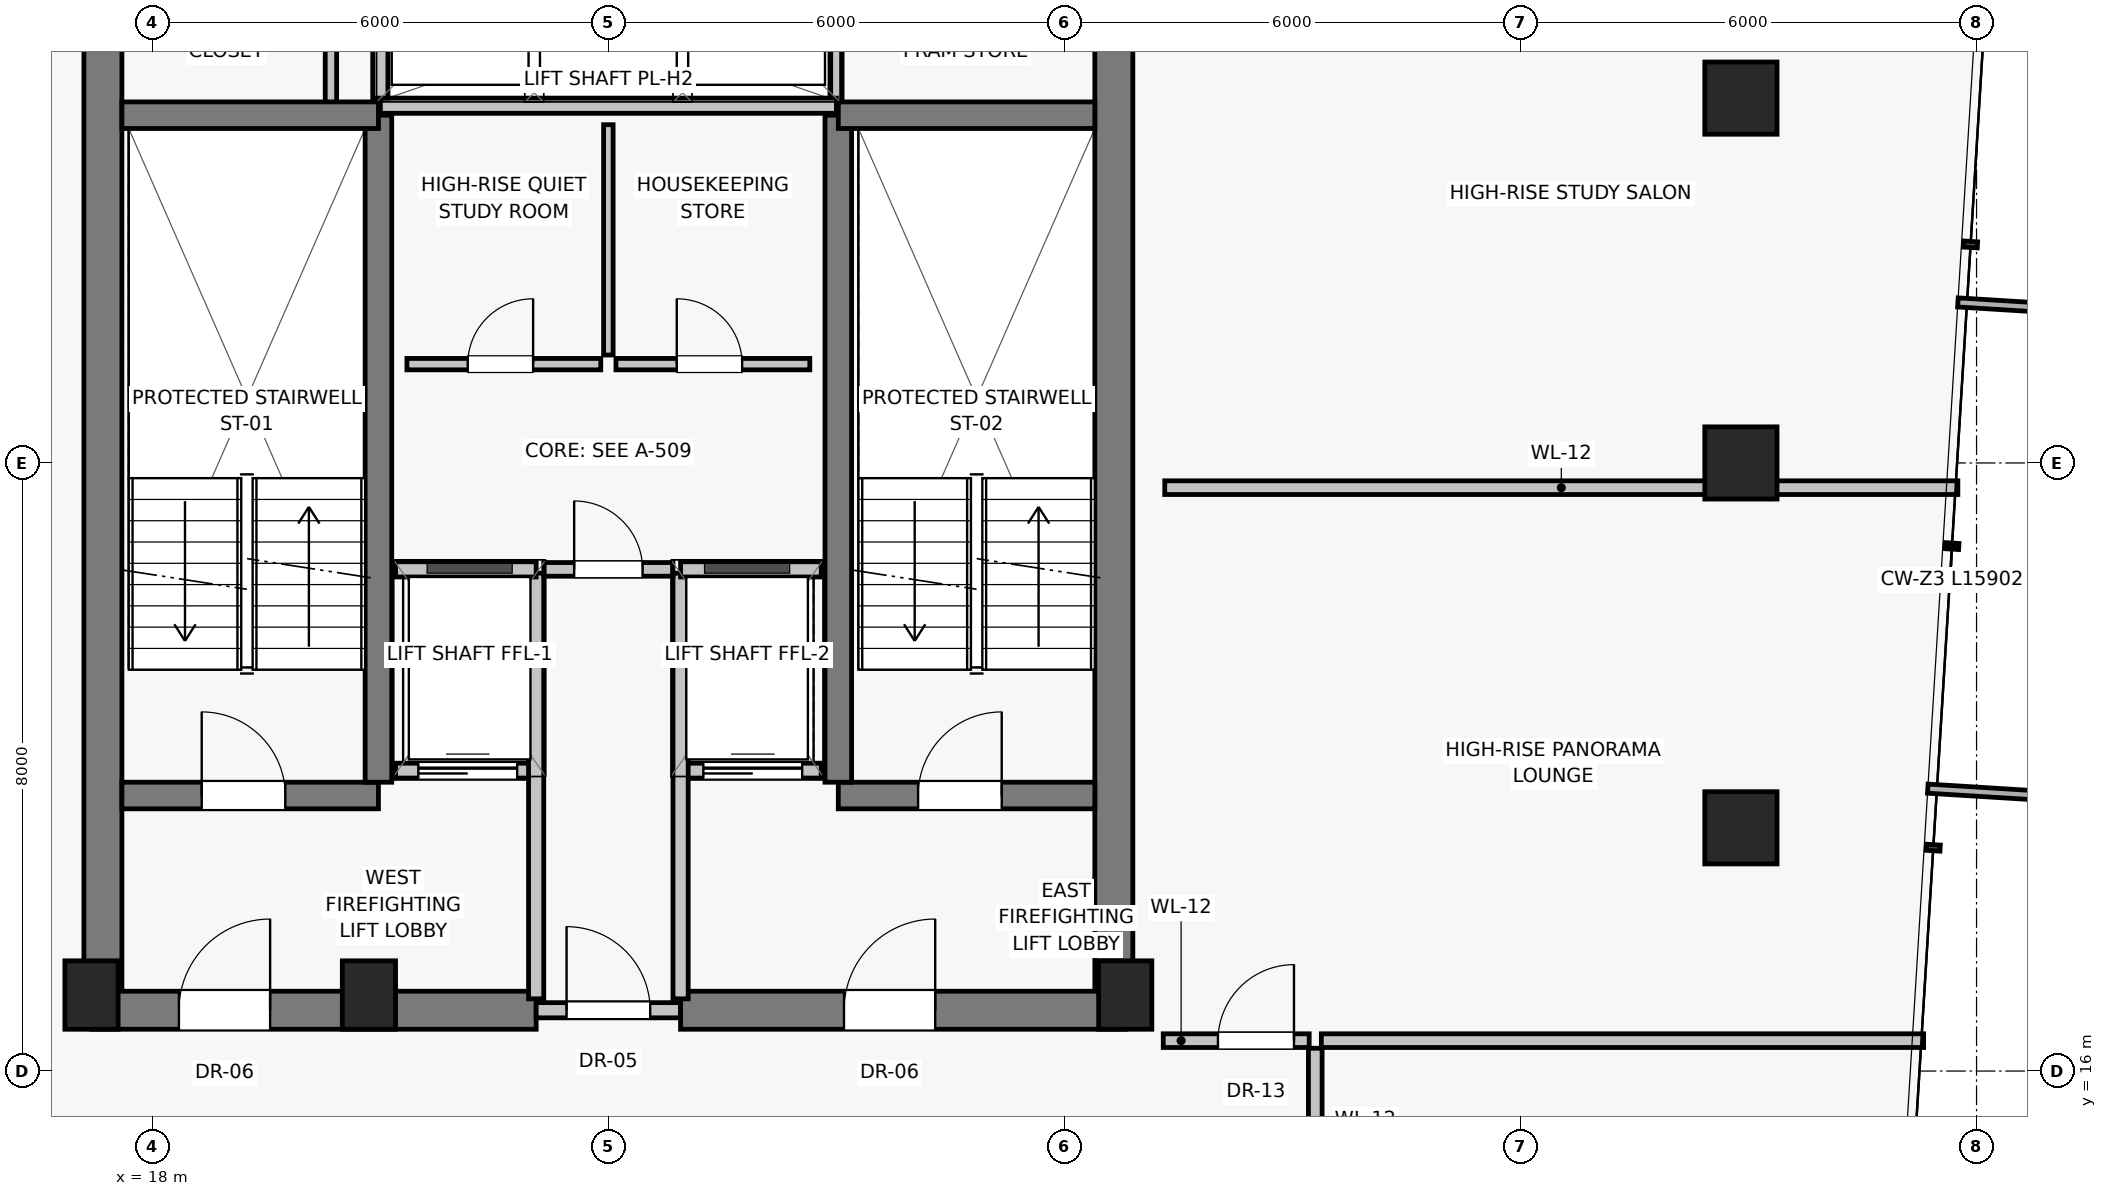
"""IFC4 building model, lengths in metres.
Left out: names, types, materials, properties, quantities, classifications, styles, units other than length and angle.
Written with IfcOpenShell. Run it as: python <this file> out.ifc"""

import sys

from ifc_helpers import new_model, si_unit, direction, frame, frame_2d, origin, origin_2d, place, context, subcontext, project, spatial, rectangle, extrude, source, transform, mapped, element, fill, save


model = new_model("IFC4")
c1 = context("Model", 3, precision=1e-05, world=origin(), true_north=direction((0.0, 1.0)))
c2 = subcontext(c1, "Body", "Model", "MODEL_VIEW")
j1 = project(units=[si_unit("LENGTHUNIT", "METRE"), si_unit("PLANEANGLEUNIT", "RADIAN")], contexts=[c1])
p1 = place(None, origin())
s1 = spatial("IfcSite", under=j1, at=p1, CompositionType="ELEMENT")
p2 = place(p1, origin())
s2 = spatial("IfcBuilding", under=s1, at=p2, CompositionType="ELEMENT")
p3 = place(p2, frame((0.0, 0.0, 218.9)))
s3 = spatial("IfcBuildingStorey", under=s2, at=p3, CompositionType="ELEMENT", Elevation=218.9)
for number, where, z_axis, x_axis in (
    (1, (17.2, 17.0, 0.0), (0.0, 0.0, 1.0), (1.0, 0.0, 0.0)),
    (2, (20.85, 17.0, 0.0), (0.0, 0.0, 1.0), (1.0, 0.0, 0.0)),
    (3, (30.8, 17.0, 0.0), (0.0, 0.0, 1.0), (1.0, 0.0, 0.0)),
):
    element("IfcColumn", number, at=place(p3, frame(where, z_axis=z_axis, x_axis=x_axis)), inside=s3, PredefinedType="PILASTER", context=c2, shape_type="SweptSolid", body=[
        extrude(rectangle(XDim=0.7, YDim=0.9, at=origin_2d()), origin(), (0.0, 0.0, 1.0), 3.25),
    ])
for number, where, z_axis, x_axis in (
    (4, (38.9, 19.2, 0.0), (0.0, 0.0, 1.0), (1.0, 0.0, 0.0)),
    (5, (38.9, 24.0, 0.0), (0.0, 0.0, 1.0), (1.0, 0.0, 0.0)),
    (6, (38.9, 28.8, 0.0), (0.0, 0.0, 1.0), (1.0, 0.0, 0.0)),
):
    element("IfcColumn", number, at=place(p3, frame(where, z_axis=z_axis, x_axis=x_axis)), inside=s3, PredefinedType="COLUMN", context=c2, shape_type="SweptSolid", body=[
        extrude(rectangle(XDim=0.95, YDim=0.95, at=origin_2d()), origin(), (0.0, 0.0, 1.0), 3.25),
    ])
for number, where, z_axis, x_axis in (
    (7, (17.35, 16.8, 0.0), (0.0, 0.0, 1.0), (0.0, 1.0, 0.0)),
    (8, (30.65, 16.8, 0.0), (0.0, 0.0, 1.0), (0.0, 1.0, 0.0)),
):
    element("IfcWall", number, at=place(p3, frame(where, z_axis=z_axis, x_axis=x_axis)), inside=s3, PredefinedType="SHEAR", context=c2, shape_type="SweptSolid", body=[
        extrude(rectangle(XDim=14.2, YDim=0.5, at=frame_2d((7.1, 0.0))), origin(), (0.0, 0.0, 1.0), 3.015),
    ])
p4 = place(p3, frame((17.2, 16.8, 0.0), z_axis=(0.0, 0.0, 1.0), x_axis=(1.0, 0.0, 0.0)))
e9 = element("IfcWall", 9, at=p4, inside=s3, PredefinedType="SHEAR", context=c2, shape_type="SweptSolid", body=[
    extrude(rectangle(XDim=5.85, YDim=0.5, at=frame_2d((2.925, 0.0))), origin(), (0.0, 0.0, 1.0), 3.015),
])
p5 = place(p4, frame((1.15, 0.0, 0.0)))
e10 = element("IfcOpeningElement", 10, at=p5, cuts=e9, PredefinedType="OPENING", context=c2, shape_type="SweptSolid", body=[
    extrude(rectangle(XDim=1.2, YDim=2.03, at=frame_2d((0.6, 1.015))), frame((0.0, 0.26, 0.0), z_axis=(0.0, -1.0, 0.0), x_axis=(1.0, 0.0, 0.0)), (0.0, 0.0, 1.0), 0.52),
])
p6 = place(p3, frame((23.05, 16.8, 0.0), z_axis=(0.0, 0.0, 1.0), x_axis=(1.0, 0.0, 0.0)))
e11 = element("IfcWall", 11, at=p6, inside=s3, PredefinedType="SOLIDWALL", context=c2, shape_type="SweptSolid", body=[
    extrude(rectangle(XDim=1.9, YDim=0.2, at=frame_2d((0.95, 0.0))), origin(), (0.0, 0.0, 1.0), 2.165),
])
p7 = place(p6, frame((0.4, 0.0, 0.0)))
e12 = element("IfcOpeningElement", 12, at=p7, cuts=e11, PredefinedType="OPENING", context=c2, shape_type="SweptSolid", body=[
    extrude(rectangle(XDim=1.1, YDim=2.03, at=frame_2d((0.55, 1.015))), frame((0.0, 0.11, 0.0), z_axis=(0.0, -1.0, 0.0), x_axis=(1.0, 0.0, 0.0)), (0.0, 0.0, 1.0), 0.22),
])
p8 = place(p3, frame((24.95, 16.8, 0.0), z_axis=(0.0, 0.0, 1.0), x_axis=(1.0, 0.0, 0.0)))
e13 = element("IfcWall", 13, at=p8, inside=s3, PredefinedType="SHEAR", context=c2, shape_type="SweptSolid", body=[
    extrude(rectangle(XDim=5.85, YDim=0.5, at=frame_2d((2.925, 0.0))), origin(), (0.0, 0.0, 1.0), 3.015),
])
p9 = place(p8, frame((2.15, 0.0, 0.0)))
e14 = element("IfcOpeningElement", 14, at=p9, cuts=e13, PredefinedType="OPENING", context=c2, shape_type="SweptSolid", body=[
    extrude(rectangle(XDim=1.2, YDim=2.03, at=frame_2d((0.6, 1.015))), frame((0.0, 0.26, 0.0), z_axis=(0.0, -1.0, 0.0), x_axis=(1.0, 0.0, 0.0)), (0.0, 0.0, 1.0), 0.52),
])
for number, where, z_axis, x_axis in (
    (15, (20.35, 28.65, 0.0), (0.0, 0.0, 1.0), (0.0, 1.0, 0.0)),
    (16, (27.0, 28.65, 0.0), (0.0, 0.0, 1.0), (0.0, 1.0, 0.0)),
):
    element("IfcWall", number, at=place(p3, frame(where, z_axis=z_axis, x_axis=x_axis)), inside=s3, PredefinedType="PARTITIONING", context=c2, shape_type="SweptSolid", body=[
        extrude(rectangle(XDim=2.2, YDim=0.15, at=frame_2d((1.1, 0.0))), origin(), (0.0, 0.0, 1.0), 3.015),
    ])
p10 = place(p3, frame((17.6, 19.625, 0.0), z_axis=(0.0, 0.0, 1.0), x_axis=(1.0, 0.0, 0.0)))
e17 = element("IfcWall", 17, at=p10, inside=s3, PredefinedType="SHEAR", context=c2, shape_type="SweptSolid", body=[
    extrude(rectangle(XDim=3.375, YDim=0.35, at=frame_2d((1.688, 0.0))), origin(), (0.0, 0.0, 1.0), 3.015),
])
p11 = place(p10, frame((1.05, 0.0, 0.0)))
e18 = element("IfcOpeningElement", 18, at=p11, cuts=e17, PredefinedType="OPENING", context=c2, shape_type="SweptSolid", body=[
    extrude(rectangle(XDim=1.1, YDim=2.03, at=frame_2d((0.55, 1.015))), frame((0.0, 0.185, 0.0), z_axis=(0.0, -1.0, 0.0), x_axis=(1.0, 0.0, 0.0)), (0.0, 0.0, 1.0), 0.37),
])
p12 = place(p3, frame((21.2, 19.95, 0.0), z_axis=(0.0, 0.0, 1.0), x_axis=(1.0, 0.0, 0.0)))
e19 = element("IfcWall", 19, at=p12, inside=s3, PredefinedType="SOLIDWALL", context=c2, shape_type="SweptSolid", body=[
    extrude(rectangle(XDim=1.85, YDim=0.2, at=frame_2d((0.925, 0.0))), origin(), (0.0, 0.0, 1.0), 3.015),
])
p13 = place(p12, frame((0.3, 0.0, 0.0)))
e20 = element("IfcOpeningElement", 20, at=p13, cuts=e19, PredefinedType="OPENING", context=c2, shape_type="SweptSolid", body=[
    extrude(rectangle(XDim=1.3, YDim=2.25, at=frame_2d((0.65, 1.125))), frame((0.0, 0.11, 0.0), z_axis=(0.0, -1.0, 0.0), x_axis=(1.0, 0.0, 0.0)), (0.0, 0.0, 1.0), 0.22),
])
p14 = place(p3, frame((24.95, 19.95, 0.0), z_axis=(0.0, 0.0, 1.0), x_axis=(1.0, 0.0, 0.0)))
e21 = element("IfcWall", 21, at=p14, inside=s3, PredefinedType="SOLIDWALL", context=c2, shape_type="SweptSolid", body=[
    extrude(rectangle(XDim=1.85, YDim=0.2, at=frame_2d((0.925, 0.0))), origin(), (0.0, 0.0, 1.0), 3.015),
])
p15 = place(p14, frame((0.3, 0.0, 0.0)))
e22 = element("IfcOpeningElement", 22, at=p15, cuts=e21, PredefinedType="OPENING", context=c2, shape_type="SweptSolid", body=[
    extrude(rectangle(XDim=1.3, YDim=2.25, at=frame_2d((0.65, 1.125))), frame((0.0, 0.11, 0.0), z_axis=(0.0, -1.0, 0.0), x_axis=(1.0, 0.0, 0.0)), (0.0, 0.0, 1.0), 0.22),
])
p16 = place(p3, frame((27.025, 19.625, 0.0), z_axis=(0.0, 0.0, 1.0), x_axis=(1.0, 0.0, 0.0)))
e23 = element("IfcWall", 23, at=p16, inside=s3, PredefinedType="SHEAR", context=c2, shape_type="SweptSolid", body=[
    extrude(rectangle(XDim=3.375, YDim=0.35, at=frame_2d((1.688, 0.0))), origin(), (0.0, 0.0, 1.0), 3.015),
])
p17 = place(p16, frame((1.05, 0.0, 0.0)))
e24 = element("IfcOpeningElement", 24, at=p17, cuts=e23, PredefinedType="OPENING", context=c2, shape_type="SweptSolid", body=[
    extrude(rectangle(XDim=1.1, YDim=2.03, at=frame_2d((0.55, 1.015))), frame((0.0, 0.185, 0.0), z_axis=(0.0, -1.0, 0.0), x_axis=(1.0, 0.0, 0.0)), (0.0, 0.0, 1.0), 0.37),
])
for number, where, z_axis, x_axis in (
    (25, (20.975, 19.8, 0.0), (0.0, 0.0, 1.0), (0.0, 1.0, 0.0)),
    (26, (27.025, 19.8, 0.0), (0.0, 0.0, 1.0), (0.0, 1.0, 0.0)),
):
    element("IfcWall", number, at=place(p3, frame(where, z_axis=z_axis, x_axis=x_axis)), inside=s3, PredefinedType="SHEAR", context=c2, shape_type="SweptSolid", body=[
        extrude(rectangle(XDim=8.775, YDim=0.35, at=frame_2d((4.387, 0.0))), origin(), (0.0, 0.0, 1.0), 3.015),
    ])
for number, where, z_axis, x_axis in (
    (27, (17.6, 28.575, 0.0), (0.0, 0.0, 1.0), (1.0, 0.0, 0.0)),
    (28, (27.025, 28.575, 0.0), (0.0, 0.0, 1.0), (1.0, 0.0, 0.0)),
):
    element("IfcWall", number, at=place(p3, frame(where, z_axis=z_axis, x_axis=x_axis)), inside=s3, PredefinedType="SHEAR", context=c2, shape_type="SweptSolid", body=[
        extrude(rectangle(XDim=3.375, YDim=0.35, at=frame_2d((1.688, 0.0))), origin(), (0.0, 0.0, 1.0), 3.015),
    ])
for number, where, z_axis, x_axis in (
    (29, (23.05, 16.95, 0.0), (0.0, 0.0, 1.0), (0.0, 1.0, 0.0)),
    (30, (24.95, 16.95, 0.0), (0.0, 0.0, 1.0), (0.0, 1.0, 0.0)),
):
    element("IfcWall", number, at=place(p3, frame(where, z_axis=z_axis, x_axis=x_axis)), inside=s3, PredefinedType="SOLIDWALL", context=c2, shape_type="SweptSolid", body=[
        extrude(rectangle(XDim=5.6, YDim=0.2, at=frame_2d((2.8, 0.0))), origin(), (0.0, 0.0, 1.0), 3.015),
    ])
for number, where, z_axis, x_axis in (
    (31, (21.2, 22.6, 0.0), (0.0, 0.0, 1.0), (1.0, 0.0, 0.0)),
    (32, (24.95, 22.6, 0.0), (0.0, 0.0, 1.0), (1.0, 0.0, 0.0)),
):
    element("IfcWall", number, at=place(p3, frame(where, z_axis=z_axis, x_axis=x_axis)), inside=s3, PredefinedType="SOLIDWALL", context=c2, shape_type="SweptSolid", body=[
        extrude(rectangle(XDim=1.85, YDim=0.2, at=frame_2d((0.925, 0.0))), origin(), (0.0, 0.0, 1.0), 3.015),
    ])
p18 = place(p3, frame((21.0, 28.7, 0.0), z_axis=(0.0, 0.0, 1.0), x_axis=(1.0, 0.0, 0.0)))
e33 = element("IfcWall", 33, at=p18, inside=s3, PredefinedType="SOLIDWALL", context=c2, shape_type="SweptSolid", body=[
    extrude(rectangle(XDim=6.0, YDim=0.2, at=frame_2d((3.0, 0.0))), origin(), (0.0, 0.0, 1.0), 3.015),
])
p19 = place(p3, frame((21.0, 28.8, 0.0), z_axis=(0.0, 0.0, 1.0), x_axis=(0.0, 1.0, 0.0)))
e34 = element("IfcWall", 34, at=p19, inside=s3, PredefinedType="SOLIDWALL", context=c2, shape_type="SweptSolid", body=[
    extrude(rectangle(XDim=1.6, YDim=0.2, at=frame_2d((0.8, 0.0))), origin(), (0.0, 0.0, 1.0), 3.015),
])
p20 = place(p3, frame((23.15, 22.6, 0.0), z_axis=(0.0, 0.0, 1.0), x_axis=(1.0, 0.0, 0.0)))
e35 = element("IfcWall", 35, at=p20, inside=s3, PredefinedType="PARTITIONING", context=c2, shape_type="SweptSolid", body=[
    extrude(rectangle(XDim=1.7, YDim=0.18, at=frame_2d((0.85, 0.0))), origin(), (0.0, 0.0, 1.0), 3.015),
])
p21 = place(p20, frame((0.4, 0.0, 0.0)))
e36 = element("IfcOpeningElement", 36, at=p21, cuts=e35, PredefinedType="OPENING", context=c2, shape_type="SweptSolid", body=[
    extrude(rectangle(XDim=0.9, YDim=2.01, at=frame_2d((0.45, 1.005))), frame((0.0, 0.1, 0.0), z_axis=(0.0, -1.0, 0.0), x_axis=(1.0, 0.0, 0.0)), (0.0, 0.0, 1.0), 0.2),
])
p22 = place(p3, frame((21.35, 25.3, 0.0), z_axis=(0.0, 0.0, 1.0), x_axis=(1.0, 0.0, 0.0)))
e37 = element("IfcWall", 37, at=p22, inside=s3, PredefinedType="PARTITIONING", context=c2, shape_type="SweptSolid", body=[
    extrude(rectangle(XDim=2.55, YDim=0.15, at=frame_2d((1.275, 0.0))), origin(), (0.0, 0.0, 1.0), 3.015),
])
p23 = place(p22, frame((0.8, 0.0, 0.0)))
e38 = element("IfcOpeningElement", 38, at=p23, cuts=e37, PredefinedType="OPENING", context=c2, shape_type="SweptSolid", body=[
    extrude(rectangle(XDim=0.86, YDim=2.01, at=frame_2d((0.43, 1.005))), frame((0.0, 0.085, 0.0), z_axis=(0.0, -1.0, 0.0), x_axis=(1.0, 0.0, 0.0)), (0.0, 0.0, 1.0), 0.17),
])
p24 = place(p3, frame((24.1, 25.3, 0.0), z_axis=(0.0, 0.0, 1.0), x_axis=(1.0, 0.0, 0.0)))
e39 = element("IfcWall", 39, at=p24, inside=s3, PredefinedType="PARTITIONING", context=c2, shape_type="SweptSolid", body=[
    extrude(rectangle(XDim=2.55, YDim=0.15, at=frame_2d((1.275, 0.0))), origin(), (0.0, 0.0, 1.0), 3.015),
])
p25 = place(p24, frame((0.8, 0.0, 0.0)))
e40 = element("IfcOpeningElement", 40, at=p25, cuts=e39, PredefinedType="OPENING", context=c2, shape_type="SweptSolid", body=[
    extrude(rectangle(XDim=0.86, YDim=2.01, at=frame_2d((0.43, 1.005))), frame((0.0, 0.085, 0.0), z_axis=(0.0, -1.0, 0.0), x_axis=(1.0, 0.0, 0.0)), (0.0, 0.0, 1.0), 0.17),
])
p26 = place(p3, frame((24.0, 25.42, 0.0), z_axis=(0.0, 0.0, 1.0), x_axis=(0.0, 1.0, 0.0)))
e41 = element("IfcWall", 41, at=p26, inside=s3, PredefinedType="PARTITIONING", context=c2, shape_type="SweptSolid", body=[
    extrude(rectangle(XDim=3.03, YDim=0.125, at=frame_2d((1.515, 0.0))), origin(), (0.0, 0.0, 1.0), 3.015),
])
p27 = place(p3, frame((31.32, 23.675, 0.0), z_axis=(0.0, 0.0, 1.0), x_axis=(1.0, 0.0, 0.0)))
e42 = element("IfcWall", 42, at=p27, inside=s3, PredefinedType="PARTITIONING", context=c2, shape_type="SweptSolid", body=[
    extrude(rectangle(XDim=10.434, YDim=0.18, at=frame_2d((5.217, 0.0))), origin(), (0.0, 0.0, 1.0), 3.015),
])
p28 = place(p3, frame((33.3, 14.4, 0.0), z_axis=(0.0, 0.0, 1.0), x_axis=(0.0, 1.0, 0.0)))
e43 = element("IfcWall", 43, at=p28, inside=s3, PredefinedType="PARTITIONING", context=c2, shape_type="SweptSolid", body=[
    extrude(rectangle(XDim=1.9, YDim=0.18, at=frame_2d((0.95, 0.0))), origin(), (0.0, 0.0, 1.0), 3.015),
])
p29 = place(p3, frame((31.3, 16.4, 0.0), z_axis=(0.0, 0.0, 1.0), x_axis=(1.0, 0.0, 0.0)))
e44 = element("IfcWall", 44, at=p29, inside=s3, PredefinedType="PARTITIONING", context=c2, shape_type="SweptSolid", body=[
    extrude(rectangle(XDim=1.92, YDim=0.18, at=frame_2d((0.96, 0.0))), origin(), (0.0, 0.0, 1.0), 3.015),
])
p30 = place(p29, frame((0.72, 0.0, 0.0)))
e45 = element("IfcOpeningElement", 45, at=p30, cuts=e44, PredefinedType="OPENING", context=c2, shape_type="SweptSolid", body=[
    extrude(rectangle(XDim=1.0, YDim=2.01, at=frame_2d((0.5, 1.005))), frame((0.0, 0.1, 0.0), z_axis=(0.0, -1.0, 0.0), x_axis=(1.0, 0.0, 0.0)), (0.0, 0.0, 1.0), 0.2),
])
p31 = place(p3, frame((33.38, 16.4, 0.0), z_axis=(0.0, 0.0, 1.0), x_axis=(1.0, 0.0, 0.0)))
e46 = element("IfcWall", 46, at=p31, inside=s3, PredefinedType="PARTITIONING", context=c2, shape_type="SweptSolid", body=[
    extrude(rectangle(XDim=7.924, YDim=0.18, at=frame_2d((3.962, 0.0))), origin(), (0.0, 0.0, 1.0), 3.015),
])
m1 = source(origin(), c2, "Body", "SweptSolid", [
    extrude(rectangle(XDim=1.2, YDim=2.03, at=frame_2d((0.6, 1.015))), frame((0.0, 0.025, 0.0), z_axis=(0.0, -1.0, 0.0), x_axis=(1.0, 0.0, 0.0)), (0.0, 0.0, 1.0), 0.05),
])
p32 = place(p5, origin())
e47 = element("IfcDoor", 47, at=p32, inside=s3, OperationType="SINGLE_SWING_RIGHT", PredefinedType="DOOR", context=c2, shape_type="MappedRepresentation", body=[
    mapped(m1, transform((0.0, 0.0, 0.0), scale=1.0)),
])
fill(e10, e47)
m2 = source(origin(), c2, "Body", "SweptSolid", [
    extrude(rectangle(XDim=1.1, YDim=2.03, at=frame_2d((0.55, 1.015))), frame((0.0, 0.025, 0.0), z_axis=(0.0, -1.0, 0.0), x_axis=(1.0, 0.0, 0.0)), (0.0, 0.0, 1.0), 0.05),
])
p33 = place(p7, origin())
e48 = element("IfcDoor", 48, at=p33, inside=s3, OperationType="SINGLE_SWING_LEFT", PredefinedType="DOOR", context=c2, shape_type="MappedRepresentation", body=[
    mapped(m2, transform((0.0, 0.0, 0.0), scale=1.0)),
])
fill(e12, e48)
p34 = place(p9, origin())
e49 = element("IfcDoor", 49, at=p34, inside=s3, OperationType="SINGLE_SWING_RIGHT", PredefinedType="DOOR", context=c2, shape_type="MappedRepresentation", body=[
    mapped(m1, transform((0.0, 0.0, 0.0), scale=1.0)),
])
fill(e14, e49)
p35 = place(p11, origin())
e50 = element("IfcDoor", 50, at=p35, inside=s3, OperationType="SINGLE_SWING_LEFT", PredefinedType="DOOR", context=c2, shape_type="MappedRepresentation", body=[
    mapped(m2, transform((0.0, 0.0, 0.0), scale=1.0)),
])
fill(e18, e50)
m3 = source(origin(), c2, "Body", "SweptSolid", [
    extrude(rectangle(XDim=1.3, YDim=2.25, at=frame_2d((0.65, 1.125))), frame((0.0, 0.025, 0.0), z_axis=(0.0, -1.0, 0.0), x_axis=(1.0, 0.0, 0.0)), (0.0, 0.0, 1.0), 0.05),
])
p36 = place(p13, origin())
e51 = element("IfcDoor", 51, at=p36, inside=s3, OperationType="SLIDING_TO_LEFT", PredefinedType="DOOR", context=c2, shape_type="MappedRepresentation", body=[
    mapped(m3, transform((0.0, 0.0, 0.0), scale=1.0)),
])
fill(e20, e51)
p37 = place(p15, origin())
e52 = element("IfcDoor", 52, at=p37, inside=s3, OperationType="SLIDING_TO_LEFT", PredefinedType="DOOR", context=c2, shape_type="MappedRepresentation", body=[
    mapped(m3, transform((0.0, 0.0, 0.0), scale=1.0)),
])
fill(e22, e52)
p38 = place(p17, origin())
e53 = element("IfcDoor", 53, at=p38, inside=s3, OperationType="SINGLE_SWING_RIGHT", PredefinedType="DOOR", context=c2, shape_type="MappedRepresentation", body=[
    mapped(m2, transform((0.0, 0.0, 0.0), scale=1.0)),
])
fill(e24, e53)
m4 = source(origin(), c2, "Body", "SweptSolid", [
    extrude(rectangle(XDim=0.9, YDim=2.01, at=frame_2d((0.45, 1.005))), frame((0.0, 0.025, 0.0), z_axis=(0.0, -1.0, 0.0), x_axis=(1.0, 0.0, 0.0)), (0.0, 0.0, 1.0), 0.05),
])
p39 = place(p21, origin())
e54 = element("IfcDoor", 54, at=p39, inside=s3, OperationType="SINGLE_SWING_LEFT", PredefinedType="DOOR", context=c2, shape_type="MappedRepresentation", body=[
    mapped(m4, transform((0.0, 0.0, 0.0), scale=1.0)),
])
fill(e36, e54)
m5 = source(origin(), c2, "Body", "SweptSolid", [
    extrude(rectangle(XDim=0.86, YDim=2.01, at=frame_2d((0.43, 1.005))), frame((0.0, 0.025, 0.0), z_axis=(0.0, -1.0, 0.0), x_axis=(1.0, 0.0, 0.0)), (0.0, 0.0, 1.0), 0.05),
])
p40 = place(p23, origin())
e55 = element("IfcDoor", 55, at=p40, inside=s3, OperationType="SINGLE_SWING_RIGHT", PredefinedType="DOOR", context=c2, shape_type="MappedRepresentation", body=[
    mapped(m5, transform((0.0, 0.0, 0.0), scale=1.0)),
])
fill(e38, e55)
p41 = place(p25, origin())
e56 = element("IfcDoor", 56, at=p41, inside=s3, OperationType="SINGLE_SWING_LEFT", PredefinedType="DOOR", context=c2, shape_type="MappedRepresentation", body=[
    mapped(m5, transform((0.0, 0.0, 0.0), scale=1.0)),
])
fill(e40, e56)
m6 = source(origin(), c2, "Body", "SweptSolid", [
    extrude(rectangle(XDim=1.0, YDim=2.01, at=frame_2d((0.5, 1.005))), frame((0.0, 0.025, 0.0), z_axis=(0.0, -1.0, 0.0), x_axis=(1.0, 0.0, 0.0)), (0.0, 0.0, 1.0), 0.05),
])
p42 = place(p30, origin())
e57 = element("IfcDoor", 57, at=p42, inside=s3, OperationType="SINGLE_SWING_RIGHT", PredefinedType="DOOR", context=c2, shape_type="MappedRepresentation", body=[
    mapped(m6, transform((0.0, 0.0, 0.0), scale=1.0)),
])
fill(e45, e57)
save(model, sys.argv[1])
